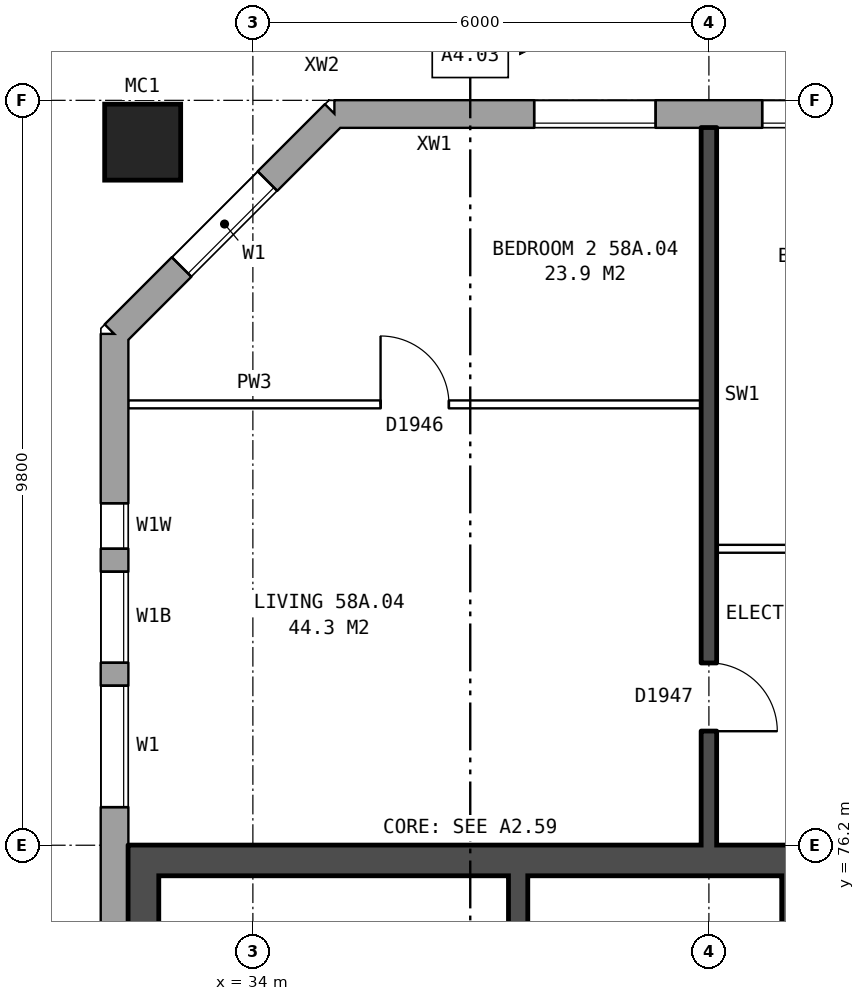
"""IFC4 building model, lengths in metres.
Left out: names, types, materials, properties, quantities, classifications, styles, units other than length and angle.
Written with IfcOpenShell. Run it as: python <this file> out.ifc"""

import sys

from ifc_helpers import new_model, si_unit, direction, frame, frame_2d, origin, origin_2d, place, context, subcontext, project, spatial, rectangle, hollow_rectangle, extrude, element, fill, save


model = new_model("IFC4")
c1 = context("Model", 3, precision=1e-05, world=origin(), true_north=direction((0.0, 1.0)))
c2 = subcontext(c1, "Body", "Model", "MODEL_VIEW")
j1 = project(units=[si_unit("LENGTHUNIT", "METRE"), si_unit("PLANEANGLEUNIT", "RADIAN")], contexts=[c1])
p1 = place(None, origin())
s1 = spatial("IfcSite", under=j1, at=p1, CompositionType="ELEMENT")
p2 = place(p1, origin())
s2 = spatial("IfcBuilding", under=s1, at=p2, CompositionType="ELEMENT")
p3 = place(p2, frame((0.0, 0.0, 205.9)))
s3 = spatial("IfcBuildingStorey", under=s2, at=p3, CompositionType="ELEMENT", Elevation=205.9)
p4 = place(p3, frame((32.55, 85.45, 0.0), z_axis=(0.0, 0.0, 1.0), x_axis=(1.0, 0.0, 0.0)))
e1 = element("IfcColumn", 1, at=p4, inside=s3, PredefinedType="COLUMN", context=c2, shape_type="SweptSolid", body=[
    extrude(hollow_rectangle(XDim=1.0, YDim=1.0, WallThickness=0.055, at=origin_2d()), origin(), (0.0, 0.0, 1.0), 3.1),
])
p5 = place(p3, frame((74.95, 85.82, 0.0), z_axis=(0.0, 0.0, 1.0), x_axis=(-1.0, 0.0, 0.0)))
e2 = element("IfcWall", 2, at=p5, inside=s3, PredefinedType="STANDARD", context=c2, shape_type="SweptSolid", body=[
    extrude(rectangle(XDim=39.875, YDim=0.36, at=frame_2d((19.938, 0.0))), origin(), (0.0, 0.0, 1.0), 2.85),
])
p6 = place(p5, frame((0.3, 0.0, 0.8)))
e3 = element("IfcOpeningElement", 3, at=p6, cuts=e2, PredefinedType="OPENING", context=c2, shape_type="SweptSolid", body=[
    extrude(rectangle(XDim=1.0, YDim=1.8, at=frame_2d((0.5, 0.9))), frame((0.0, 0.19, 0.0), z_axis=(0.0, -1.0, 0.0), x_axis=(1.0, 0.0, 0.0)), (0.0, 0.0, 1.0), 0.38),
])
p7 = place(p5, frame((5.65, 0.0, 0.8)))
e4 = element("IfcOpeningElement", 4, at=p7, cuts=e2, PredefinedType="OPENING", context=c2, shape_type="SweptSolid", body=[
    extrude(rectangle(XDim=1.6, YDim=1.8, at=frame_2d((0.8, 0.9))), frame((0.0, 0.19, 0.0), z_axis=(0.0, -1.0, 0.0), x_axis=(1.0, 0.0, 0.0)), (0.0, 0.0, 1.0), 0.38),
])
p8 = place(p5, frame((8.65, 0.0, 0.8)))
e5 = element("IfcOpeningElement", 5, at=p8, cuts=e2, PredefinedType="OPENING", context=c2, shape_type="SweptSolid", body=[
    extrude(rectangle(XDim=1.6, YDim=1.8, at=frame_2d((0.8, 0.9))), frame((0.0, 0.19, 0.0), z_axis=(0.0, -1.0, 0.0), x_axis=(1.0, 0.0, 0.0)), (0.0, 0.0, 1.0), 0.38),
])
p9 = place(p5, frame((11.65, 0.0, 0.8)))
e6 = element("IfcOpeningElement", 6, at=p9, cuts=e2, PredefinedType="OPENING", context=c2, shape_type="SweptSolid", body=[
    extrude(rectangle(XDim=1.6, YDim=1.8, at=frame_2d((0.8, 0.9))), frame((0.0, 0.19, 0.0), z_axis=(0.0, -1.0, 0.0), x_axis=(1.0, 0.0, 0.0)), (0.0, 0.0, 1.0), 0.38),
])
p10 = place(p5, frame((14.65, 0.0, 0.8)))
e7 = element("IfcOpeningElement", 7, at=p10, cuts=e2, PredefinedType="OPENING", context=c2, shape_type="SweptSolid", body=[
    extrude(rectangle(XDim=1.6, YDim=1.8, at=frame_2d((0.8, 0.9))), frame((0.0, 0.19, 0.0), z_axis=(0.0, -1.0, 0.0), x_axis=(1.0, 0.0, 0.0)), (0.0, 0.0, 1.0), 0.38),
])
p11 = place(p5, frame((17.65, 0.0, 0.8)))
e8 = element("IfcOpeningElement", 8, at=p11, cuts=e2, PredefinedType="OPENING", context=c2, shape_type="SweptSolid", body=[
    extrude(rectangle(XDim=1.6, YDim=1.8, at=frame_2d((0.8, 0.9))), frame((0.0, 0.19, 0.0), z_axis=(0.0, -1.0, 0.0), x_axis=(1.0, 0.0, 0.0)), (0.0, 0.0, 1.0), 0.38),
])
p12 = place(p5, frame((20.65, 0.0, 0.8)))
e9 = element("IfcOpeningElement", 9, at=p12, cuts=e2, PredefinedType="OPENING", context=c2, shape_type="SweptSolid", body=[
    extrude(rectangle(XDim=1.6, YDim=1.8, at=frame_2d((0.8, 0.9))), frame((0.0, 0.19, 0.0), z_axis=(0.0, -1.0, 0.0), x_axis=(1.0, 0.0, 0.0)), (0.0, 0.0, 1.0), 0.38),
])
p13 = place(p5, frame((23.65, 0.0, 0.8)))
e10 = element("IfcOpeningElement", 10, at=p13, cuts=e2, PredefinedType="OPENING", context=c2, shape_type="SweptSolid", body=[
    extrude(rectangle(XDim=1.6, YDim=1.8, at=frame_2d((0.8, 0.9))), frame((0.0, 0.19, 0.0), z_axis=(0.0, -1.0, 0.0), x_axis=(1.0, 0.0, 0.0)), (0.0, 0.0, 1.0), 0.38),
])
p14 = place(p5, frame((26.65, 0.0, 0.8)))
e11 = element("IfcOpeningElement", 11, at=p14, cuts=e2, PredefinedType="OPENING", context=c2, shape_type="SweptSolid", body=[
    extrude(rectangle(XDim=1.6, YDim=1.8, at=frame_2d((0.8, 0.9))), frame((0.0, 0.19, 0.0), z_axis=(0.0, -1.0, 0.0), x_axis=(1.0, 0.0, 0.0)), (0.0, 0.0, 1.0), 0.38),
])
p15 = place(p5, frame((29.65, 0.0, 0.8)))
e12 = element("IfcOpeningElement", 12, at=p15, cuts=e2, PredefinedType="OPENING", context=c2, shape_type="SweptSolid", body=[
    extrude(rectangle(XDim=1.6, YDim=1.8, at=frame_2d((0.8, 0.9))), frame((0.0, 0.19, 0.0), z_axis=(0.0, -1.0, 0.0), x_axis=(1.0, 0.0, 0.0)), (0.0, 0.0, 1.0), 0.38),
])
p16 = place(p5, frame((32.65, 0.0, 0.8)))
e13 = element("IfcOpeningElement", 13, at=p16, cuts=e2, PredefinedType="OPENING", context=c2, shape_type="SweptSolid", body=[
    extrude(rectangle(XDim=1.6, YDim=1.8, at=frame_2d((0.8, 0.9))), frame((0.0, 0.19, 0.0), z_axis=(0.0, -1.0, 0.0), x_axis=(1.0, 0.0, 0.0)), (0.0, 0.0, 1.0), 0.38),
])
p17 = place(p5, frame((35.65, 0.0, 0.8)))
e14 = element("IfcOpeningElement", 14, at=p17, cuts=e2, PredefinedType="OPENING", context=c2, shape_type="SweptSolid", body=[
    extrude(rectangle(XDim=1.6, YDim=1.8, at=frame_2d((0.8, 0.9))), frame((0.0, 0.19, 0.0), z_axis=(0.0, -1.0, 0.0), x_axis=(1.0, 0.0, 0.0)), (0.0, 0.0, 1.0), 0.38),
])
p18 = place(p5, frame((3.7, 0.0, 0.8)))
e15 = element("IfcOpeningElement", 15, at=p18, cuts=e2, PredefinedType="OPENING", context=c2, shape_type="SweptSolid", body=[
    extrude(rectangle(XDim=1.0, YDim=1.8, at=frame_2d((0.5, 0.9))), frame((0.0, 0.19, 0.0), z_axis=(0.0, -1.0, 0.0), x_axis=(1.0, 0.0, 0.0)), (0.0, 0.0, 1.0), 0.38),
])
p19 = place(p3, frame((35.075, 85.82, 0.0), z_axis=(0.0, 0.0, 1.0), x_axis=(-0.707106781187, -0.707106781187, 0.0)))
e16 = element("IfcWall", 16, at=p19, inside=s3, PredefinedType="STANDARD", context=c2, shape_type="SweptSolid", body=[
    extrude(rectangle(XDim=4.094, YDim=0.36, at=frame_2d((2.047, 0.0))), origin(), (0.0, 0.0, 1.0), 2.85),
])
p20 = place(p19, frame((1.247, 0.0, 0.8)))
e17 = element("IfcOpeningElement", 17, at=p20, cuts=e16, PredefinedType="OPENING", context=c2, shape_type="SweptSolid", body=[
    extrude(rectangle(XDim=1.6, YDim=1.8, at=frame_2d((0.8, 0.9))), frame((0.0, 0.19, 0.0), z_axis=(0.0, -1.0, 0.0), x_axis=(1.0, 0.0, 0.0)), (0.0, 0.0, 1.0), 0.38),
])
p21 = place(p3, frame((32.18, 82.925, 0.0), z_axis=(0.0, 0.0, 1.0), x_axis=(0.0, -1.0, 0.0)))
e18 = element("IfcWall", 18, at=p21, inside=s3, PredefinedType="STANDARD", context=c2, shape_type="SweptSolid", body=[
    extrude(rectangle(XDim=25.851, YDim=0.36, at=frame_2d((12.925, 0.0))), origin(), (0.0, 0.0, 1.0), 2.85),
])
p22 = place(p21, frame((2.225, 0.0, 0.8)))
e19 = element("IfcOpeningElement", 19, at=p22, cuts=e18, PredefinedType="OPENING", context=c2, shape_type="SweptSolid", body=[
    extrude(rectangle(XDim=0.6, YDim=0.9, at=frame_2d((0.3, 0.45))), frame((0.0, 0.19, 0.0), z_axis=(0.0, -1.0, 0.0), x_axis=(1.0, 0.0, 0.0)), (0.0, 0.0, 1.0), 0.38),
])
p23 = place(p21, frame((4.625, 0.0, 0.8)))
e20 = element("IfcOpeningElement", 20, at=p23, cuts=e18, PredefinedType="OPENING", context=c2, shape_type="SweptSolid", body=[
    extrude(rectangle(XDim=1.6, YDim=1.8, at=frame_2d((0.8, 0.9))), frame((0.0, 0.19, 0.0), z_axis=(0.0, -1.0, 0.0), x_axis=(1.0, 0.0, 0.0)), (0.0, 0.0, 1.0), 0.38),
])
p24 = place(p21, frame((19.625, 0.0, 0.8)))
e21 = element("IfcOpeningElement", 21, at=p24, cuts=e18, PredefinedType="OPENING", context=c2, shape_type="SweptSolid", body=[
    extrude(rectangle(XDim=1.6, YDim=1.8, at=frame_2d((0.8, 0.9))), frame((0.0, 0.19, 0.0), z_axis=(0.0, -1.0, 0.0), x_axis=(1.0, 0.0, 0.0)), (0.0, 0.0, 1.0), 0.38),
])
p25 = place(p21, frame((21.525, 0.0, 0.8)))
e22 = element("IfcOpeningElement", 22, at=p25, cuts=e18, PredefinedType="OPENING", context=c2, shape_type="SweptSolid", body=[
    extrude(rectangle(XDim=1.2, YDim=1.8, at=frame_2d((0.6, 0.9))), frame((0.0, 0.19, 0.0), z_axis=(0.0, -1.0, 0.0), x_axis=(1.0, 0.0, 0.0)), (0.0, 0.0, 1.0), 0.38),
])
p26 = place(p21, frame((3.125, 0.0, 0.8)))
e23 = element("IfcOpeningElement", 23, at=p26, cuts=e18, PredefinedType="OPENING", context=c2, shape_type="SweptSolid", body=[
    extrude(rectangle(XDim=1.2, YDim=1.8, at=frame_2d((0.6, 0.9))), frame((0.0, 0.19, 0.0), z_axis=(0.0, -1.0, 0.0), x_axis=(1.0, 0.0, 0.0)), (0.0, 0.0, 1.0), 0.38),
])
p27 = place(p21, frame((23.025, 0.0, 0.8)))
e24 = element("IfcOpeningElement", 24, at=p27, cuts=e18, PredefinedType="OPENING", context=c2, shape_type="SweptSolid", body=[
    extrude(rectangle(XDim=0.6, YDim=0.9, at=frame_2d((0.3, 0.45))), frame((0.0, 0.19, 0.0), z_axis=(0.0, -1.0, 0.0), x_axis=(1.0, 0.0, 0.0)), (0.0, 0.0, 1.0), 0.38),
])
p28 = place(p3, frame((41.16, 76.2, 0.0), z_axis=(0.0, 0.0, 1.0), x_axis=(0.0, -1.0, 0.0)))
e25 = element("IfcWall", 25, at=p28, inside=s3, PredefinedType="SHEAR", context=c2, shape_type="SweptSolid", body=[
    extrude(rectangle(XDim=12.4, YDim=0.4, at=frame_2d((6.2, 0.0))), origin(), (0.0, 0.0, 1.0), 2.85),
])
p29 = place(p28, frame((1.325, 0.0, 0.0)))
e26 = element("IfcOpeningElement", 26, at=p29, cuts=e25, PredefinedType="OPENING", context=c2, shape_type="SweptSolid", body=[
    extrude(rectangle(XDim=1.1, YDim=2.1, at=frame_2d((0.55, 1.05))), frame((0.0, 0.21, 0.0), z_axis=(0.0, -1.0, 0.0), x_axis=(1.0, 0.0, 0.0)), (0.0, 0.0, 1.0), 0.42),
])
p30 = place(p28, frame((4.225, 0.0, 0.0)))
e27 = element("IfcOpeningElement", 27, at=p30, cuts=e25, PredefinedType="OPENING", context=c2, shape_type="SweptSolid", body=[
    extrude(rectangle(XDim=0.85, YDim=2.1, at=frame_2d((0.425, 1.05))), frame((0.0, 0.21, 0.0), z_axis=(0.0, -1.0, 0.0), x_axis=(1.0, 0.0, 0.0)), (0.0, 0.0, 1.0), 0.42),
])
p31 = place(p28, frame((7.475, 0.0, 0.0)))
e28 = element("IfcOpeningElement", 28, at=p31, cuts=e25, PredefinedType="OPENING", context=c2, shape_type="SweptSolid", body=[
    extrude(rectangle(XDim=0.85, YDim=2.1, at=frame_2d((0.425, 1.05))), frame((0.0, 0.21, 0.0), z_axis=(0.0, -1.0, 0.0), x_axis=(1.0, 0.0, 0.0)), (0.0, 0.0, 1.0), 0.42),
])
p32 = place(p28, frame((9.9, 0.0, 0.0)))
e29 = element("IfcOpeningElement", 29, at=p32, cuts=e25, PredefinedType="OPENING", context=c2, shape_type="SweptSolid", body=[
    extrude(rectangle(XDim=1.1, YDim=2.1, at=frame_2d((0.55, 1.05))), frame((0.0, 0.21, 0.0), z_axis=(0.0, -1.0, 0.0), x_axis=(1.0, 0.0, 0.0)), (0.0, 0.0, 1.0), 0.42),
])
p33 = place(p3, frame((32.56, 76.2, 0.0), z_axis=(0.0, 0.0, 1.0), x_axis=(0.0, -1.0, 0.0)))
e30 = element("IfcWall", 30, at=p33, inside=s3, PredefinedType="SHEAR", context=c2, shape_type="SweptSolid", body=[
    extrude(rectangle(XDim=12.4, YDim=0.4, at=frame_2d((6.2, 0.0))), origin(), (0.0, 0.0, 1.0), 2.85),
])
p34 = place(p3, frame((40.96, 76.0, 0.0), z_axis=(0.0, 0.0, 1.0), x_axis=(-1.0, 0.0, 0.0)))
e31 = element("IfcWall", 31, at=p34, inside=s3, PredefinedType="SHEAR", context=c2, shape_type="SweptSolid", body=[
    extrude(rectangle(XDim=8.2, YDim=0.4, at=frame_2d((4.1, 0.0))), origin(), (0.0, 0.0, 1.0), 2.85),
])
p35 = place(p3, frame((37.49, 75.8, 0.0), z_axis=(0.0, 0.0, 1.0), x_axis=(0.0, -1.0, 0.0)))
e32 = element("IfcWall", 32, at=p35, inside=s3, PredefinedType="SHEAR", context=c2, shape_type="SweptSolid", body=[
    extrude(rectangle(XDim=2.525, YDim=0.25, at=frame_2d((1.263, 0.0))), origin(), (0.0, 0.0, 1.0), 2.85),
])
p36 = place(p3, frame((40.1, 80.1, 0.0), z_axis=(0.0, 0.0, 1.0), x_axis=(1.0, 0.0, 0.0)))
e33 = element("IfcWall", 33, at=p36, inside=s3, PredefinedType="PARTITIONING", context=c2, shape_type="SweptSolid", body=[
    extrude(rectangle(XDim=5.8, YDim=0.1, at=frame_2d((2.9, 0.0))), origin(), (0.0, 0.0, 1.0), 2.85),
])
p37 = place(p36, frame((1.3, 0.0, 0.0)))
e34 = element("IfcOpeningElement", 34, at=p37, cuts=e33, PredefinedType="OPENING", context=c2, shape_type="SweptSolid", body=[
    extrude(rectangle(XDim=0.9, YDim=2.1, at=frame_2d((0.45, 1.05))), frame((0.0, 0.06, 0.0), z_axis=(0.0, -1.0, 0.0), x_axis=(1.0, 0.0, 0.0)), (0.0, 0.0, 1.0), 0.12),
])
p38 = place(p36, frame((4.2, 0.0, 0.0)))
e35 = element("IfcOpeningElement", 35, at=p38, cuts=e33, PredefinedType="OPENING", context=c2, shape_type="SweptSolid", body=[
    extrude(rectangle(XDim=0.9, YDim=2.1, at=frame_2d((0.45, 1.05))), frame((0.0, 0.06, 0.0), z_axis=(0.0, -1.0, 0.0), x_axis=(1.0, 0.0, 0.0)), (0.0, 0.0, 1.0), 0.12),
])
p39 = place(p3, frame((32.36, 82.0, 0.0), z_axis=(0.0, 0.0, 1.0), x_axis=(1.0, 0.0, 0.0)))
e36 = element("IfcWall", 36, at=p39, inside=s3, PredefinedType="PARTITIONING", context=c2, shape_type="SweptSolid", body=[
    extrude(rectangle(XDim=7.54, YDim=0.1, at=frame_2d((3.77, 0.0))), origin(), (0.0, 0.0, 1.0), 2.85),
])
p40 = place(p39, frame((3.32, 0.0, 0.0)))
e37 = element("IfcOpeningElement", 37, at=p40, cuts=e36, PredefinedType="OPENING", context=c2, shape_type="SweptSolid", body=[
    extrude(rectangle(XDim=0.9, YDim=2.1, at=frame_2d((0.45, 1.05))), frame((0.0, 0.06, 0.0), z_axis=(0.0, -1.0, 0.0), x_axis=(1.0, 0.0, 0.0)), (0.0, 0.0, 1.0), 0.12),
])
p41 = place(p3, frame((40.0, 76.2, 0.0), z_axis=(0.0, 0.0, 1.0), x_axis=(0.0, 1.0, 0.0)))
e38 = element("IfcWall", 38, at=p41, inside=s3, PredefinedType="SOLIDWALL", context=c2, shape_type="SweptSolid", body=[
    extrude(rectangle(XDim=9.44, YDim=0.2, at=frame_2d((4.72, 0.0))), origin(), (0.0, 0.0, 1.0), 2.85),
])
p42 = place(p41, frame((1.5, 0.0, 0.0)))
e39 = element("IfcOpeningElement", 39, at=p42, cuts=e38, PredefinedType="OPENING", context=c2, shape_type="SweptSolid", body=[
    extrude(rectangle(XDim=0.9, YDim=2.1, at=frame_2d((0.45, 1.05))), frame((0.0, 0.11, 0.0), z_axis=(0.0, -1.0, 0.0), x_axis=(1.0, 0.0, 0.0)), (0.0, 0.0, 1.0), 0.22),
])
p43 = place(p16, origin())
e40 = element("IfcWindow", 40, at=p43, inside=s3, PartitioningType="SINGLE_PANEL", PredefinedType="WINDOW", context=c2, shape_type="SweptSolid", body=[
    extrude(rectangle(XDim=1.6, YDim=1.8, at=frame_2d((0.8, 0.9))), frame((0.0, 0.15, 0.0), z_axis=(0.0, -1.0, 0.0), x_axis=(1.0, 0.0, 0.0)), (0.0, 0.0, 1.0), 0.06),
])
fill(e13, e40)
p44 = place(p17, origin())
e41 = element("IfcWindow", 41, at=p44, inside=s3, PartitioningType="SINGLE_PANEL", PredefinedType="WINDOW", context=c2, shape_type="SweptSolid", body=[
    extrude(rectangle(XDim=1.6, YDim=1.8, at=frame_2d((0.8, 0.9))), frame((0.0, 0.15, 0.0), z_axis=(0.0, -1.0, 0.0), x_axis=(1.0, 0.0, 0.0)), (0.0, 0.0, 1.0), 0.06),
])
fill(e14, e41)
p45 = place(p20, origin())
e42 = element("IfcWindow", 42, at=p45, inside=s3, PartitioningType="SINGLE_PANEL", PredefinedType="WINDOW", context=c2, shape_type="SweptSolid", body=[
    extrude(rectangle(XDim=1.6, YDim=1.8, at=frame_2d((0.8, 0.9))), frame((0.0, 0.15, 0.0), z_axis=(0.0, -1.0, 0.0), x_axis=(1.0, 0.0, 0.0)), (0.0, 0.0, 1.0), 0.06),
])
fill(e17, e42)
p46 = place(p22, origin())
e43 = element("IfcWindow", 43, at=p46, inside=s3, PartitioningType="SINGLE_PANEL", PredefinedType="WINDOW", context=c2, shape_type="SweptSolid", body=[
    extrude(rectangle(XDim=0.6, YDim=0.9, at=frame_2d((0.3, 0.45))), frame((0.0, 0.15, 0.0), z_axis=(0.0, -1.0, 0.0), x_axis=(1.0, 0.0, 0.0)), (0.0, 0.0, 1.0), 0.06),
])
fill(e19, e43)
p47 = place(p23, origin())
e44 = element("IfcWindow", 44, at=p47, inside=s3, PartitioningType="SINGLE_PANEL", PredefinedType="WINDOW", context=c2, shape_type="SweptSolid", body=[
    extrude(rectangle(XDim=1.6, YDim=1.8, at=frame_2d((0.8, 0.9))), frame((0.0, 0.15, 0.0), z_axis=(0.0, -1.0, 0.0), x_axis=(1.0, 0.0, 0.0)), (0.0, 0.0, 1.0), 0.06),
])
fill(e20, e44)
p48 = place(p40, origin())
e45 = element("IfcDoor", 45, at=p48, inside=s3, OperationType="SINGLE_SWING_LEFT", PredefinedType="DOOR", context=c2, shape_type="SweptSolid", body=[
    extrude(rectangle(XDim=0.9, YDim=2.1, at=frame_2d((0.45, 1.05))), frame((0.0, 0.025, 0.0), z_axis=(0.0, -1.0, 0.0), x_axis=(1.0, 0.0, 0.0)), (0.0, 0.0, 1.0), 0.05),
])
fill(e37, e45)
p49 = place(p42, frame((0.9, 0.0, 0.0), z_axis=(0.0, 0.0, 1.0), x_axis=(-1.0, 0.0, 0.0)))
e46 = element("IfcDoor", 46, at=p49, inside=s3, OperationType="SINGLE_SWING_RIGHT", PredefinedType="DOOR", context=c2, shape_type="SweptSolid", body=[
    extrude(rectangle(XDim=0.9, YDim=2.1, at=frame_2d((0.45, 1.05))), frame((0.0, 0.025, 0.0), z_axis=(0.0, -1.0, 0.0), x_axis=(1.0, 0.0, 0.0)), (0.0, 0.0, 1.0), 0.05),
])
fill(e39, e46)
p50 = place(p26, origin())
e47 = element("IfcWindow", 47, at=p50, inside=s3, PartitioningType="SINGLE_PANEL", PredefinedType="WINDOW", context=c2, shape_type="SweptSolid", body=[
    extrude(rectangle(XDim=1.2, YDim=1.8, at=frame_2d((0.6, 0.9))), frame((0.0, 0.15, 0.0), z_axis=(0.0, -1.0, 0.0), x_axis=(1.0, 0.0, 0.0)), (0.0, 0.0, 1.0), 0.06),
])
fill(e23, e47)
save(model, sys.argv[1])
